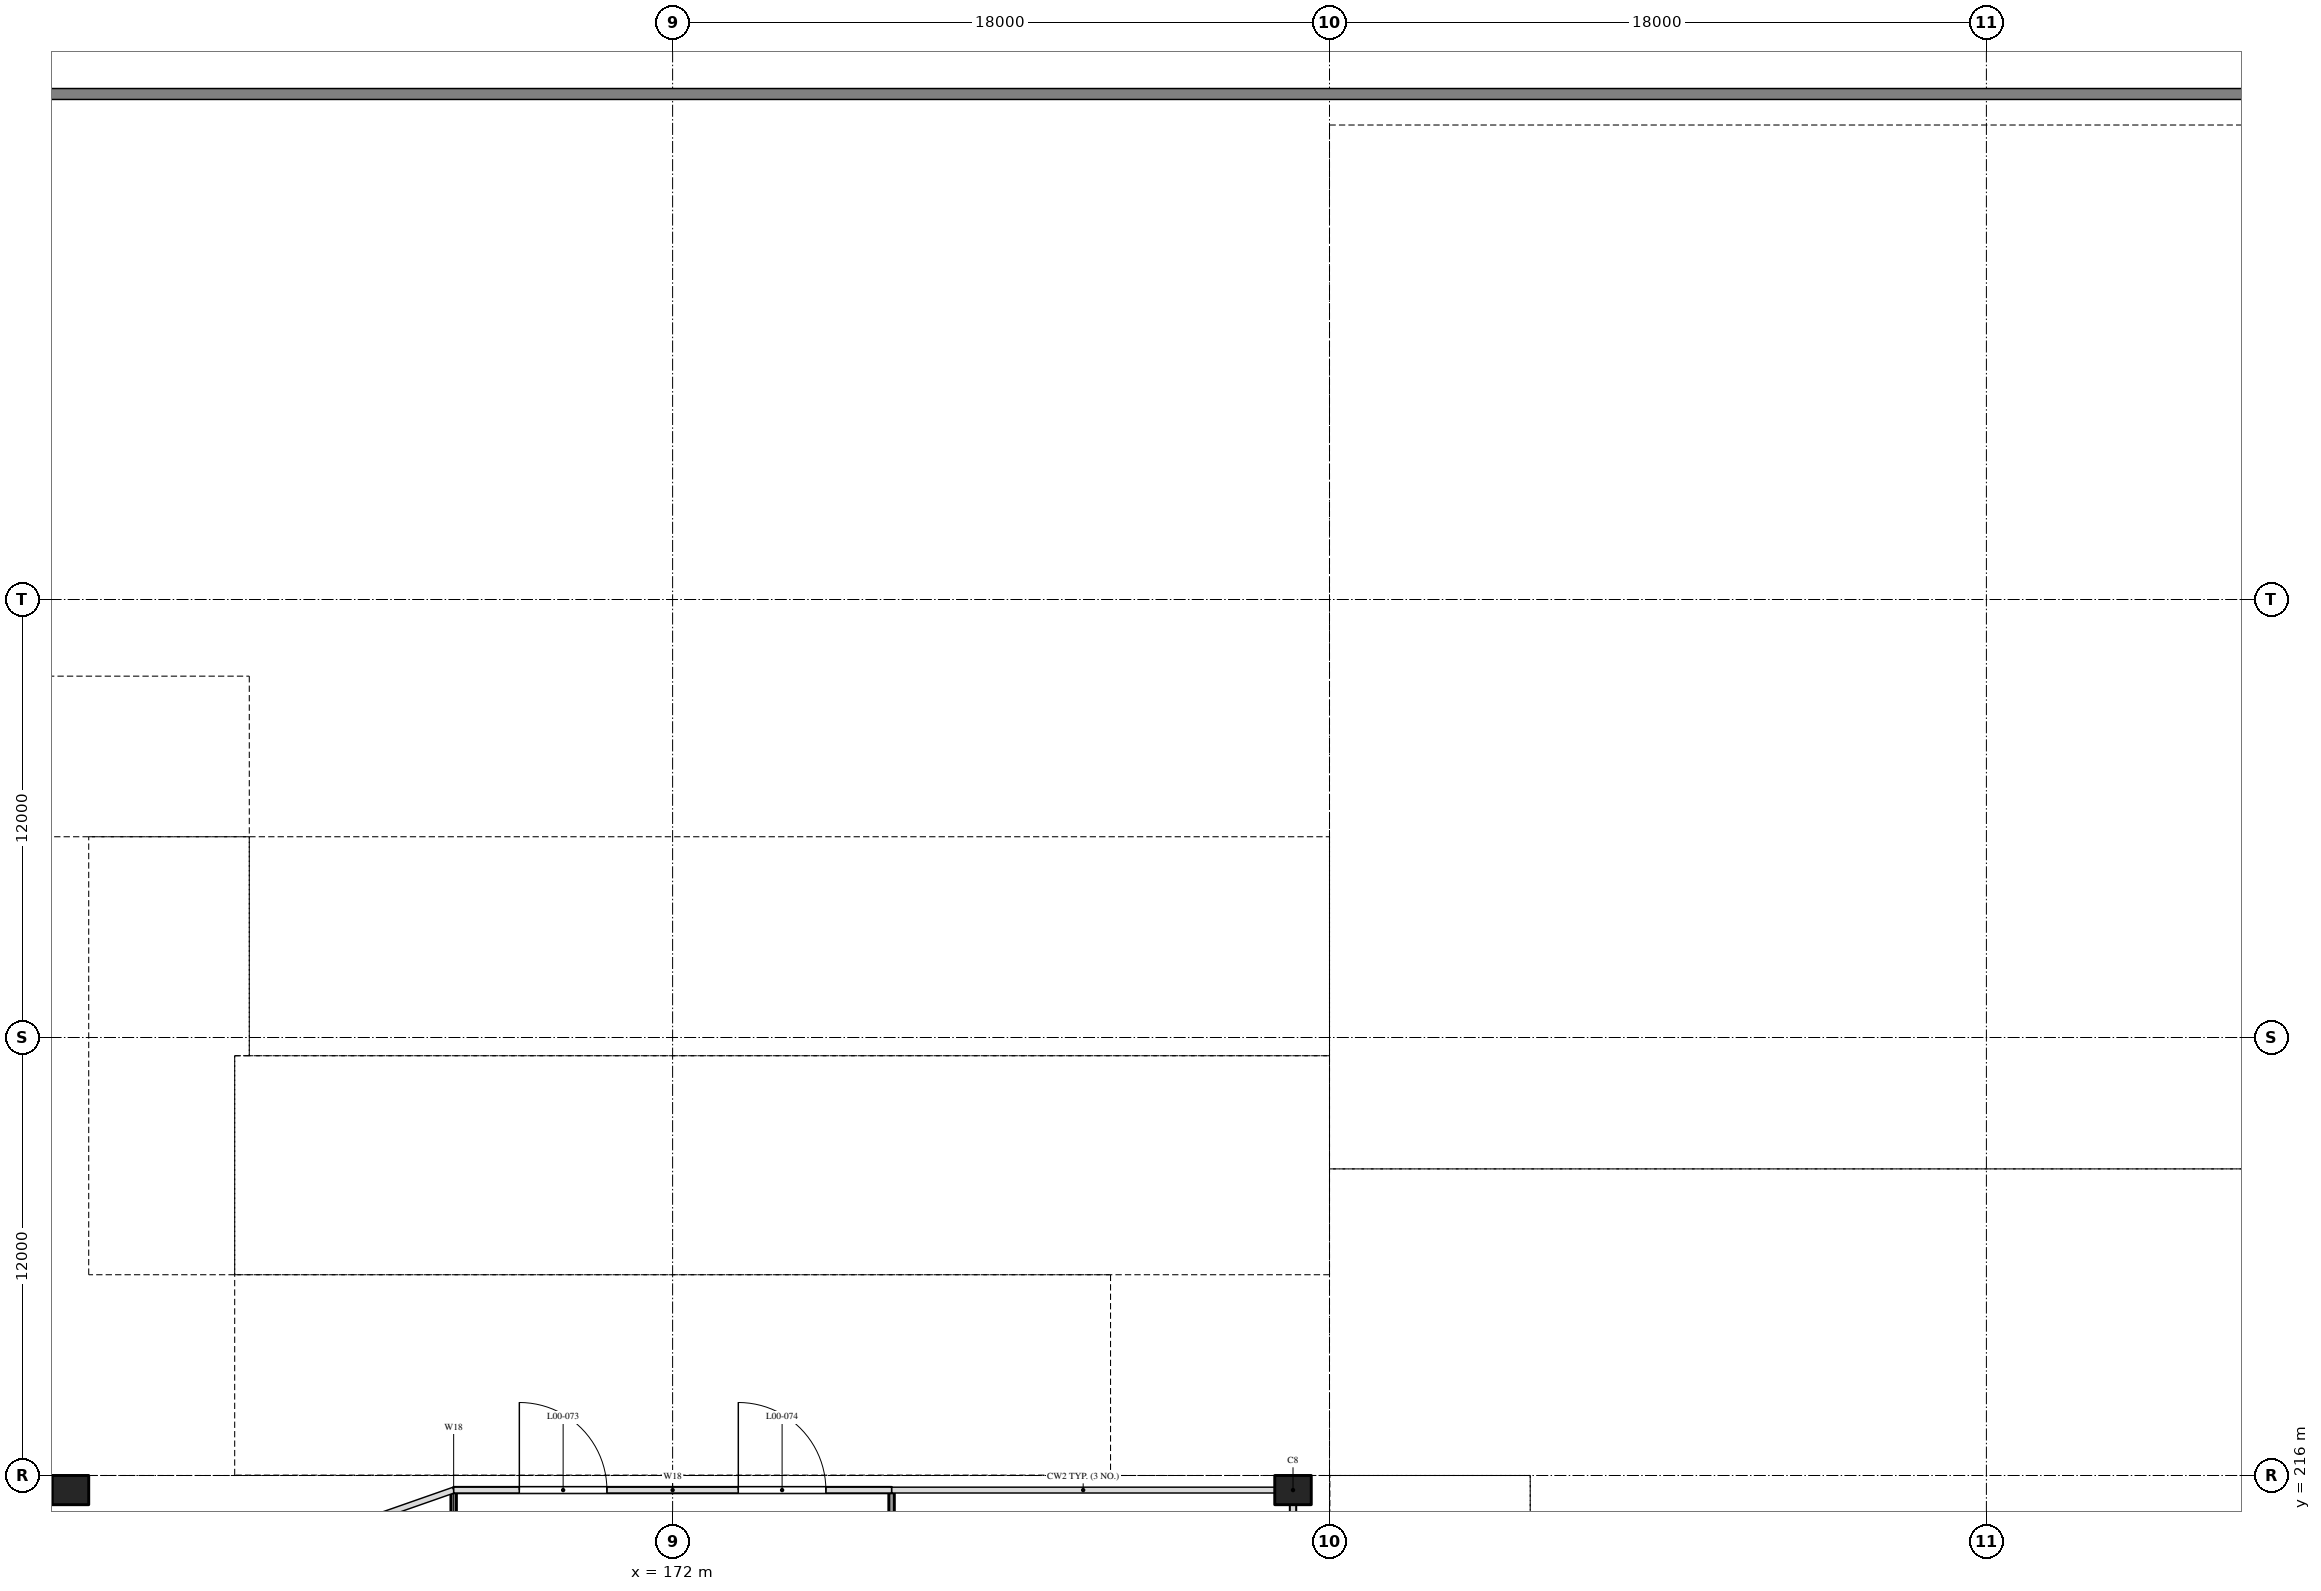
"""IFC4 building model, lengths in metres.
Left out: names, types, materials, properties, quantities, classifications, styles, units other than length and angle.
Written with IfcOpenShell. Run it as: python <this file> out.ifc"""

import sys

from ifc_helpers import new_model, si_unit, direction, frame, frame_2d, origin, origin_2d, place, context, subcontext, project, spatial, rectangle, extrude, element, fill, save


model = new_model("IFC4")
c1 = context("Model", 3, precision=1e-05, world=origin(), true_north=direction((0.0, 1.0)))
c2 = subcontext(c1, "Body", "Model", "MODEL_VIEW")
j1 = project(units=[si_unit("LENGTHUNIT", "METRE"), si_unit("PLANEANGLEUNIT", "RADIAN")], contexts=[c1])
p1 = place(None, origin())
s1 = spatial("IfcSite", under=j1, at=p1, CompositionType="ELEMENT")
p2 = place(p1, origin())
s2 = spatial("IfcBuilding", under=s1, at=p2, CompositionType="ELEMENT")
p3 = place(p2, origin())
s3 = spatial("IfcBuildingStorey", under=s2, at=p3, CompositionType="ELEMENT", Elevation=0.0)
for number, where, z_axis, x_axis in (
    (1, (155.5, 215.6, -0.4), (0.0, 0.0, 1.0), (1.0, 0.0, 0.0)),
    (2, (189.0, 215.6, -0.4), (0.0, 0.0, 1.0), (1.0, 0.0, 0.0)),
):
    element("IfcColumn", number, at=place(p3, frame(where, z_axis=z_axis, x_axis=x_axis)), inside=s3, PredefinedType="COLUMN", context=c2, shape_type="SweptSolid", body=[
        extrude(rectangle(XDim=1.0, YDim=0.8, at=origin_2d()), origin(), (0.0, 0.0, 1.0), 7.6),
    ])
p4 = place(p3, frame((197.908, 199.678, -0.3), z_axis=(0.0, 0.0, 1.0), x_axis=(0.809017930405, 0.587783963956, 0.0)))
e3 = element("IfcWall", 3, at=p4, inside=s3, PredefinedType="SOLIDWALL", context=c2, shape_type="SweptSolid", body=[
    extrude(rectangle(XDim=60.4, YDim=0.5, at=frame_2d((30.2, 0.0))), origin(), (0.0, 0.0, 1.0), 7.5),
])
p5 = place(p4, frame((41.2, 0.0, 0.3)))
e4 = element("IfcOpeningElement", 4, at=p5, cuts=e3, PredefinedType="OPENING", context=c2, shape_type="SweptSolid", body=[
    extrude(rectangle(XDim=2.4, YDim=2.4, at=frame_2d((1.2, 1.2))), frame((0.0, 0.26, 0.0), z_axis=(0.0, -1.0, 0.0), x_axis=(1.0, 0.0, 0.0)), (0.0, 0.0, 1.0), 0.52),
])
p6 = place(p4, frame((33.2, 0.0, 0.3)))
e5 = element("IfcOpeningElement", 5, at=p6, cuts=e3, PredefinedType="OPENING", context=c2, shape_type="SweptSolid", body=[
    extrude(rectangle(XDim=2.4, YDim=2.4, at=frame_2d((1.2, 1.2))), frame((0.0, 0.26, 0.0), z_axis=(0.0, -1.0, 0.0), x_axis=(1.0, 0.0, 0.0)), (0.0, 0.0, 1.0), 0.52),
])
p7 = place(p4, frame((0.5, 0.0, 0.3)))
e6 = element("IfcOpeningElement", 6, at=p7, cuts=e3, PredefinedType="OPENING", context=c2, shape_type="SweptSolid", body=[
    extrude(rectangle(XDim=2.1, YDim=2.1, at=frame_2d((1.05, 1.05))), frame((0.0, 0.26, 0.0), z_axis=(0.0, -1.0, 0.0), x_axis=(1.0, 0.0, 0.0)), (0.0, 0.0, 1.0), 0.52),
])
p8 = place(p4, frame((15.6, 0.0, 0.3)))
e7 = element("IfcOpeningElement", 7, at=p8, cuts=e3, PredefinedType="OPENING", context=c2, shape_type="SweptSolid", body=[
    extrude(rectangle(XDim=2.1, YDim=2.1, at=frame_2d((1.05, 1.05))), frame((0.0, 0.26, 0.0), z_axis=(0.0, -1.0, 0.0), x_axis=(1.0, 0.0, 0.0)), (0.0, 0.0, 1.0), 0.52),
])
p9 = place(p4, frame((50.75, 0.0, 2.4)))
e8 = element("IfcOpeningElement", 8, at=p9, cuts=e3, PredefinedType="OPENING", context=c2, shape_type="SweptSolid", body=[
    extrude(rectangle(XDim=1.2, YDim=1.2, at=frame_2d((0.6, 0.6))), frame((0.0, 0.26, 0.0), z_axis=(0.0, -1.0, 0.0), x_axis=(1.0, 0.0, 0.0)), (0.0, 0.0, 1.0), 0.52),
])
p10 = place(p4, frame((53.45, 0.0, 2.4)))
e9 = element("IfcOpeningElement", 9, at=p10, cuts=e3, PredefinedType="OPENING", context=c2, shape_type="SweptSolid", body=[
    extrude(rectangle(XDim=1.5, YDim=1.2, at=frame_2d((0.75, 0.6))), frame((0.0, 0.26, 0.0), z_axis=(0.0, -1.0, 0.0), x_axis=(1.0, 0.0, 0.0)), (0.0, 0.0, 1.0), 0.52),
])
p11 = place(p4, frame((57.35, 0.0, 2.4)))
e10 = element("IfcOpeningElement", 10, at=p11, cuts=e3, PredefinedType="OPENING", context=c2, shape_type="SweptSolid", body=[
    extrude(rectangle(XDim=1.5, YDim=1.2, at=frame_2d((0.75, 0.6))), frame((0.0, 0.26, 0.0), z_axis=(0.0, -1.0, 0.0), x_axis=(1.0, 0.0, 0.0)), (0.0, 0.0, 1.0), 0.52),
])
p12 = place(p3, frame((166.0, 215.6, 0.0), z_axis=(0.0, 0.0, 1.0), x_axis=(1.0, 0.0, 0.0)))
e11 = element("IfcWall", 11, at=p12, inside=s3, PredefinedType="SOLIDWALL", context=c2, shape_type="SweptSolid", body=[
    extrude(rectangle(XDim=12.0, YDim=0.15, at=frame_2d((6.0, 0.0))), origin(), (0.0, 0.0, 1.0), 4.3),
])
p13 = place(p12, frame((1.8, 0.0, 0.0)))
e12 = element("IfcOpeningElement", 12, at=p13, cuts=e11, PredefinedType="OPENING", context=c2, shape_type="SweptSolid", body=[
    extrude(rectangle(XDim=2.4, YDim=2.4, at=frame_2d((1.2, 1.2))), frame((0.0, 0.085, 0.0), z_axis=(0.0, -1.0, 0.0), x_axis=(1.0, 0.0, 0.0)), (0.0, 0.0, 1.0), 0.17),
])
p14 = place(p12, frame((7.8, 0.0, 0.0)))
e13 = element("IfcOpeningElement", 13, at=p14, cuts=e11, PredefinedType="OPENING", context=c2, shape_type="SweptSolid", body=[
    extrude(rectangle(XDim=2.4, YDim=2.4, at=frame_2d((1.2, 1.2))), frame((0.0, 0.085, 0.0), z_axis=(0.0, -1.0, 0.0), x_axis=(1.0, 0.0, 0.0)), (0.0, 0.0, 1.0), 0.17),
])
for number, where, z_axis, x_axis in (
    (14, (166.0, 210.775, 0.0), (0.0, 0.0, 1.0), (0.0, 1.0, 0.0)),
    (15, (178.0, 210.775, 0.0), (0.0, 0.0, 1.0), (0.0, 1.0, 0.0)),
):
    element("IfcWall", number, at=place(p3, frame(where, z_axis=z_axis, x_axis=x_axis)), inside=s3, PredefinedType="SOLIDWALL", context=c2, shape_type="SweptSolid", body=[
        extrude(rectangle(XDim=4.75, YDim=0.15, at=frame_2d((2.375, 0.0))), origin(), (0.0, 0.0, 1.0), 4.3),
    ])
p15 = place(p3, frame((189.0, 211.4, 0.0), z_axis=(0.0, 0.0, 1.0), x_axis=(0.0, 1.0, 0.0)))
e16 = element("IfcWall", 16, at=p15, inside=s3, PredefinedType="SOLIDWALL", context=c2, shape_type="SweptSolid", body=[
    extrude(rectangle(XDim=3.8, YDim=0.15, at=frame_2d((1.9, 0.0))), origin(), (0.0, 0.0, 1.0), 4.5),
])
p16 = place(p15, frame((0.7, 0.0, 0.0)))
e17 = element("IfcOpeningElement", 17, at=p16, cuts=e16, PredefinedType="OPENING", context=c2, shape_type="SweptSolid", body=[
    extrude(rectangle(XDim=2.4, YDim=2.4, at=frame_2d((1.2, 1.2))), frame((0.0, 0.085, 0.0), z_axis=(0.0, -1.0, 0.0), x_axis=(1.0, 0.0, 0.0)), (0.0, 0.0, 1.0), 0.17),
])
p17 = place(p13, origin())
e18 = element("IfcDoor", 18, at=p17, inside=s3, OperationType="DOUBLE_DOOR_SINGLE_SWING", PredefinedType="DOOR", context=c2, shape_type="SweptSolid", body=[
    extrude(rectangle(XDim=2.4, YDim=2.4, at=frame_2d((1.2, 1.2))), frame((0.0, 0.025, 0.0), z_axis=(0.0, -1.0, 0.0), x_axis=(1.0, 0.0, 0.0)), (0.0, 0.0, 1.0), 0.05),
])
fill(e12, e18)
p18 = place(p14, origin())
e19 = element("IfcDoor", 19, at=p18, inside=s3, OperationType="DOUBLE_DOOR_SINGLE_SWING", PredefinedType="DOOR", context=c2, shape_type="SweptSolid", body=[
    extrude(rectangle(XDim=2.4, YDim=2.4, at=frame_2d((1.2, 1.2))), frame((0.0, 0.025, 0.0), z_axis=(0.0, -1.0, 0.0), x_axis=(1.0, 0.0, 0.0)), (0.0, 0.0, 1.0), 0.05),
])
fill(e13, e19)
save(model, sys.argv[1])
